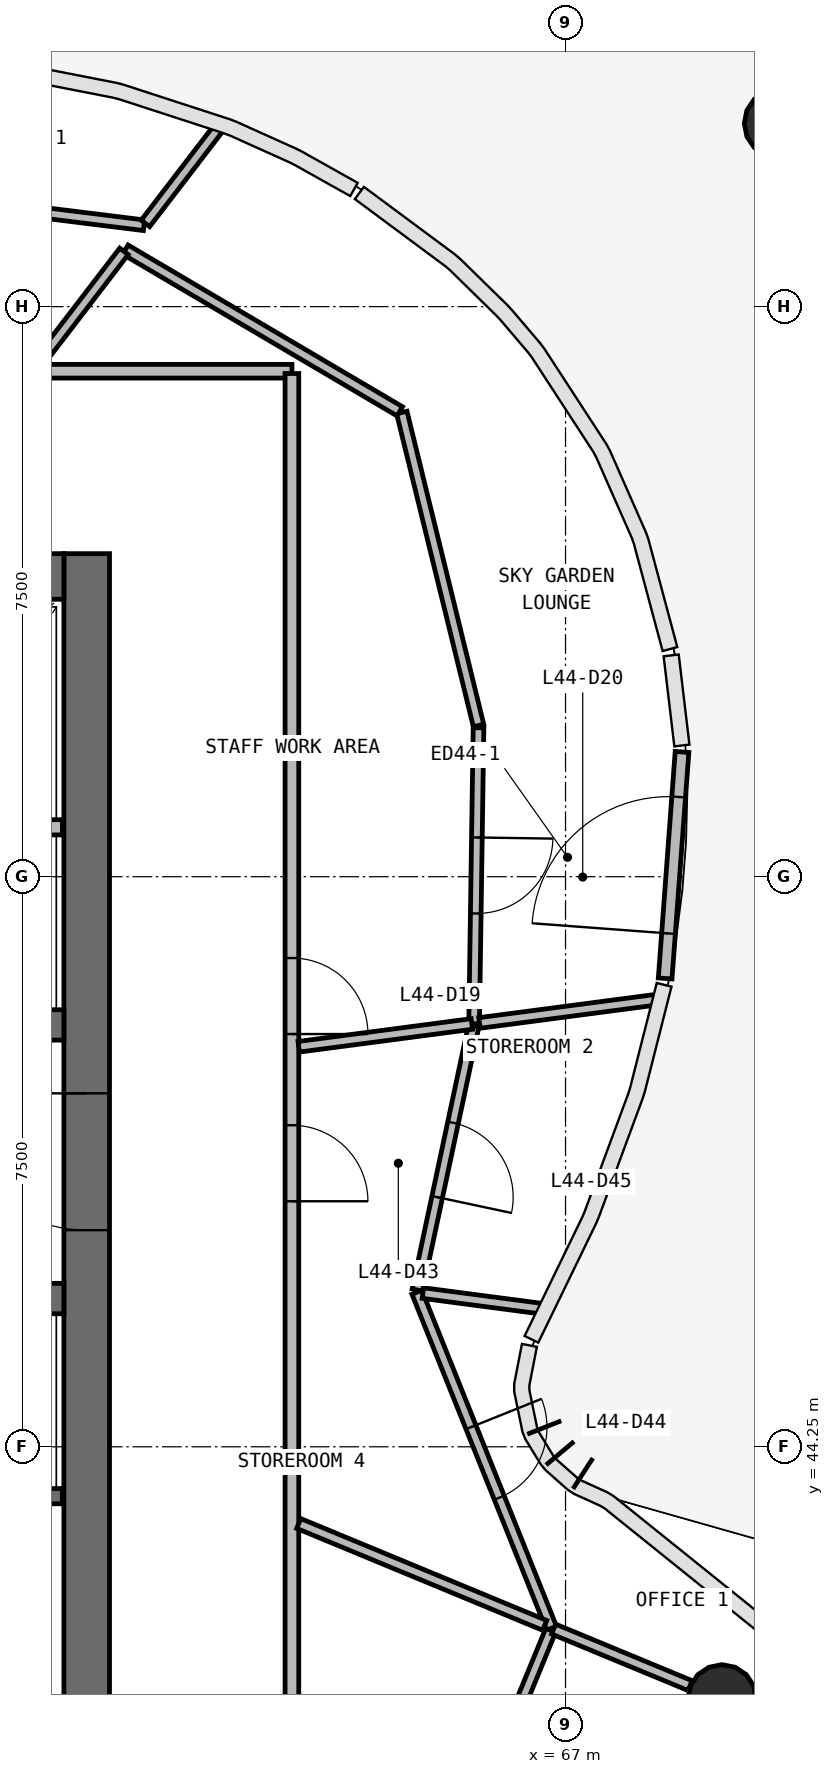
"""IFC4 building model, lengths in metres.
Left out: names, types, materials, properties, quantities, classifications, styles, units other than length and angle.
Written with IfcOpenShell. Run it as: python <this file> out.ifc"""

import sys

from ifc_helpers import new_model, si_unit, direction, frame, frame_2d, origin, origin_2d, place, context, subcontext, project, spatial, rectangle, circle, extrude, source, transform, mapped, element, fill, save


model = new_model("IFC4")
c1 = context("Model", 3, precision=1e-05, world=origin(), true_north=direction((0.0, 1.0)))
c2 = subcontext(c1, "Body", "Model", "MODEL_VIEW")
j1 = project(units=[si_unit("LENGTHUNIT", "METRE"), si_unit("PLANEANGLEUNIT", "RADIAN")], contexts=[c1])
p1 = place(None, origin())
s1 = spatial("IfcSite", under=j1, at=p1, CompositionType="ELEMENT")
p2 = place(p1, origin())
s2 = spatial("IfcBuilding", under=s1, at=p2, CompositionType="ELEMENT")
p3 = place(p2, frame((0.0, 0.0, 183.8)))
s3 = spatial("IfcBuildingStorey", under=s2, at=p3, CompositionType="ELEMENT", Elevation=183.8)
p4 = place(p3, frame((60.7, 40.0, 0.0), z_axis=(0.0, 0.0, 1.0), x_axis=(0.0, 1.0, 0.0)))
e1 = element("IfcWall", 1, at=p4, inside=s3, PredefinedType="SHEAR", context=c2, shape_type="SweptSolid", body=[
    extrude(rectangle(XDim=16.0, YDim=0.6, at=frame_2d((8.0, 0.0))), origin(), (0.0, 0.0, 1.0), 3.9),
])
p5 = place(p4, frame((7.1, 0.0, 0.0)))
e2 = element("IfcOpeningElement", 2, at=p5, cuts=e1, PredefinedType="OPENING", context=c2, shape_type="SweptSolid", body=[
    extrude(rectangle(XDim=1.8, YDim=2.1, at=frame_2d((0.9, 1.05))), frame((0.0, 0.31, 0.0), z_axis=(0.0, -1.0, 0.0), x_axis=(1.0, 0.0, 0.0)), (0.0, 0.0, 1.0), 0.62),
])
p6 = place(p3, frame((60.4, 55.7, 0.0), z_axis=(0.0, 0.0, 1.0), x_axis=(-1.0, 0.0, 0.0)))
e3 = element("IfcWall", 3, at=p6, inside=s3, PredefinedType="SHEAR", context=c2, shape_type="SweptSolid", body=[
    extrude(rectangle(XDim=16.8, YDim=0.6, at=frame_2d((8.4, 0.0))), origin(), (0.0, 0.0, 1.0), 3.9),
])
p7 = place(p6, frame((0.4, 0.0, 0.0)))
e4 = element("IfcOpeningElement", 4, at=p7, cuts=e3, PredefinedType="OPENING", context=c2, shape_type="SweptSolid", body=[
    extrude(rectangle(XDim=1.1, YDim=2.1, at=frame_2d((0.55, 1.05))), frame((0.0, 0.31, 0.0), z_axis=(0.0, -1.0, 0.0), x_axis=(1.0, 0.0, 0.0)), (0.0, 0.0, 1.0), 0.62),
])
p8 = place(p6, frame((10.3, 0.0, 0.0)))
e5 = element("IfcOpeningElement", 5, at=p8, cuts=e3, PredefinedType="OPENING", context=c2, shape_type="SweptSolid", body=[
    extrude(rectangle(XDim=1.2, YDim=2.1, at=frame_2d((0.6, 1.05))), frame((0.0, 0.31, 0.0), z_axis=(0.0, -1.0, 0.0), x_axis=(1.0, 0.0, 0.0)), (0.0, 0.0, 1.0), 0.62),
])
p9 = place(p6, frame((7.25, 0.0, 0.0)))
e6 = element("IfcOpeningElement", 6, at=p9, cuts=e3, PredefinedType="OPENING", context=c2, shape_type="SweptSolid", body=[
    extrude(rectangle(XDim=1.1, YDim=2.1, at=frame_2d((0.55, 1.05))), frame((0.0, 0.31, 0.0), z_axis=(0.0, -1.0, 0.0), x_axis=(1.0, 0.0, 0.0)), (0.0, 0.0, 1.0), 0.62),
])
p10 = place(p3, frame((43.6, 49.8, 0.0), z_axis=(0.0, 0.0, 1.0), x_axis=(1.0, 0.0, 0.0)))
e7 = element("IfcWall", 7, at=p10, inside=s3, PredefinedType="SHEAR", context=c2, shape_type="SweptSolid", body=[
    extrude(rectangle(XDim=16.8, YDim=0.4, at=frame_2d((8.4, 0.0))), origin(), (0.0, 0.0, 1.0), 3.9),
])
p11 = place(p10, frame((9.8, 0.0, 0.0)))
e8 = element("IfcOpeningElement", 8, at=p11, cuts=e7, PredefinedType="OPENING", context=c2, shape_type="SweptSolid", body=[
    extrude(rectangle(XDim=1.1, YDim=2.1, at=frame_2d((0.55, 1.05))), frame((0.0, 0.21, 0.0), z_axis=(0.0, -1.0, 0.0), x_axis=(1.0, 0.0, 0.0)), (0.0, 0.0, 1.0), 0.42),
])
p12 = place(p10, frame((12.3, 0.0, 0.0)))
e9 = element("IfcOpeningElement", 9, at=p12, cuts=e7, PredefinedType="OPENING", context=c2, shape_type="SweptSolid", body=[
    extrude(rectangle(XDim=1.1, YDim=2.1, at=frame_2d((0.55, 1.05))), frame((0.0, 0.21, 0.0), z_axis=(0.0, -1.0, 0.0), x_axis=(1.0, 0.0, 0.0)), (0.0, 0.0, 1.0), 0.42),
])
p13 = place(p10, frame((14.8, 0.0, 0.0)))
e10 = element("IfcOpeningElement", 10, at=p13, cuts=e7, PredefinedType="OPENING", context=c2, shape_type="SweptSolid", body=[
    extrude(rectangle(XDim=1.1, YDim=2.1, at=frame_2d((0.55, 1.05))), frame((0.0, 0.21, 0.0), z_axis=(0.0, -1.0, 0.0), x_axis=(1.0, 0.0, 0.0)), (0.0, 0.0, 1.0), 0.42),
])
p14 = place(p10, frame((4.45, 0.0, 0.0)))
e11 = element("IfcOpeningElement", 11, at=p14, cuts=e7, PredefinedType="OPENING", context=c2, shape_type="SweptSolid", body=[
    extrude(rectangle(XDim=0.9, YDim=2.1, at=frame_2d((0.45, 1.05))), frame((0.0, 0.21, 0.0), z_axis=(0.0, -1.0, 0.0), x_axis=(1.0, 0.0, 0.0)), (0.0, 0.0, 1.0), 0.42),
])
p15 = place(p10, frame((7.85, 0.0, 0.0)))
e12 = element("IfcOpeningElement", 12, at=p15, cuts=e7, PredefinedType="OPENING", context=c2, shape_type="SweptSolid", body=[
    extrude(rectangle(XDim=0.9, YDim=2.1, at=frame_2d((0.45, 1.05))), frame((0.0, 0.21, 0.0), z_axis=(0.0, -1.0, 0.0), x_axis=(1.0, 0.0, 0.0)), (0.0, 0.0, 1.0), 0.42),
])
p16 = place(p3, frame((43.6, 46.2, 0.0), z_axis=(0.0, 0.0, 1.0), x_axis=(1.0, 0.0, 0.0)))
e13 = element("IfcWall", 13, at=p16, inside=s3, PredefinedType="SHEAR", context=c2, shape_type="SweptSolid", body=[
    extrude(rectangle(XDim=16.8, YDim=0.4, at=frame_2d((8.4, 0.0))), origin(), (0.0, 0.0, 1.0), 3.9),
])
p17 = place(p16, frame((9.8, 0.0, 0.0)))
e14 = element("IfcOpeningElement", 14, at=p17, cuts=e13, PredefinedType="OPENING", context=c2, shape_type="SweptSolid", body=[
    extrude(rectangle(XDim=1.1, YDim=2.1, at=frame_2d((0.55, 1.05))), frame((0.0, 0.21, 0.0), z_axis=(0.0, -1.0, 0.0), x_axis=(1.0, 0.0, 0.0)), (0.0, 0.0, 1.0), 0.42),
])
p18 = place(p16, frame((12.3, 0.0, 0.0)))
e15 = element("IfcOpeningElement", 15, at=p18, cuts=e13, PredefinedType="OPENING", context=c2, shape_type="SweptSolid", body=[
    extrude(rectangle(XDim=1.1, YDim=2.1, at=frame_2d((0.55, 1.05))), frame((0.0, 0.21, 0.0), z_axis=(0.0, -1.0, 0.0), x_axis=(1.0, 0.0, 0.0)), (0.0, 0.0, 1.0), 0.42),
])
p19 = place(p16, frame((14.8, 0.0, 0.0)))
e16 = element("IfcOpeningElement", 16, at=p19, cuts=e13, PredefinedType="OPENING", context=c2, shape_type="SweptSolid", body=[
    extrude(rectangle(XDim=1.1, YDim=2.1, at=frame_2d((0.55, 1.05))), frame((0.0, 0.21, 0.0), z_axis=(0.0, -1.0, 0.0), x_axis=(1.0, 0.0, 0.0)), (0.0, 0.0, 1.0), 0.42),
])
p20 = place(p16, frame((7.85, 0.0, 0.0)))
e17 = element("IfcOpeningElement", 17, at=p20, cuts=e13, PredefinedType="OPENING", context=c2, shape_type="SweptSolid", body=[
    extrude(rectangle(XDim=0.9, YDim=2.1, at=frame_2d((0.45, 1.05))), frame((0.0, 0.21, 0.0), z_axis=(0.0, -1.0, 0.0), x_axis=(1.0, 0.0, 0.0)), (0.0, 0.0, 1.0), 0.42),
])
m1 = source(origin(), c2, "Body", "SweptSolid", [
    extrude(circle(Radius=0.45, at=origin_2d()), origin(), (0.0, 0.0, 1.0), 4.22),
])
for number, where, z_axis, x_axis in (
    (18, (69.802, 61.66, -0.32), (0.0, 0.0, 1.0), (1.0, 0.0, 0.0)),
    (19, (69.059, 40.934, -0.32), (0.0, 0.0, 1.0), (1.0, 0.0, 0.0)),
):
    element("IfcColumn", number, at=place(p3, frame(where, z_axis=z_axis, x_axis=x_axis)), inside=s3, PredefinedType="COLUMN", context=c2, shape_type="MappedRepresentation", body=[
        mapped(m1, transform((0.0, 0.0, 0.0), scale=1.0)),
    ])
p21 = place(p3, frame((68.311, 50.412, 0.0), z_axis=(0.0, 0.0, 1.0), x_axis=(0.074271967477, 0.997238023166, 0.0)))
e20 = element("IfcWall", 20, at=p21, inside=s3, PredefinedType="STANDARD", context=c2, shape_type="SweptSolid", body=[
    extrude(rectangle(XDim=2.988, YDim=0.18, at=frame_2d((1.494, 0.0))), origin(), (0.0, 0.0, 1.0), 3.58),
])
p22 = place(p21, frame((0.594, 0.0, 0.0)))
e21 = element("IfcOpeningElement", 21, at=p22, cuts=e20, PredefinedType="OPENING", context=c2, shape_type="SweptSolid", body=[
    extrude(rectangle(XDim=1.8, YDim=2.4, at=frame_2d((0.9, 1.2))), frame((0.0, 0.1, 0.0), z_axis=(0.0, -1.0, 0.0), x_axis=(1.0, 0.0, 0.0)), (0.0, 0.0, 1.0), 0.2),
])
p23 = place(p3, frame((57.7, 43.6, 0.0), z_axis=(0.0, 0.0, 1.0), x_axis=(1.0, 0.0, 0.0)))
e22 = element("IfcWall", 22, at=p23, inside=s3, PredefinedType="SOLIDWALL", context=c2, shape_type="SweptSolid", body=[
    extrude(rectangle(XDim=2.68, YDim=0.2, at=frame_2d((1.34, 0.0))), origin(), (0.0, 0.0, 1.0), 3.58),
])
p24 = place(p3, frame((60.38, 52.4, 0.0), z_axis=(0.0, 0.0, 1.0), x_axis=(-1.0, 0.0, 0.0)))
e23 = element("IfcWall", 23, at=p24, inside=s3, PredefinedType="SOLIDWALL", context=c2, shape_type="SweptSolid", body=[
    extrude(rectangle(XDim=1.85, YDim=0.2, at=frame_2d((0.925, 0.0))), origin(), (0.0, 0.0, 1.0), 3.58),
])
p25 = place(p3, frame((40.6, 58.4, 0.0), z_axis=(0.0, 0.0, 1.0), x_axis=(1.0, 0.0, 0.0)))
e24 = element("IfcWall", 24, at=p25, inside=s3, PredefinedType="PARTITIONING", context=c2, shape_type="SweptSolid", body=[
    extrude(rectangle(XDim=22.8, YDim=0.18, at=frame_2d((11.4, 0.0))), origin(), (0.0, 0.0, 1.0), 2.88),
])
p26 = place(p25, frame((16.05, 0.0, 0.0)))
e25 = element("IfcOpeningElement", 25, at=p26, cuts=e24, PredefinedType="OPENING", context=c2, shape_type="SweptSolid", body=[
    extrude(rectangle(XDim=0.9, YDim=2.1, at=frame_2d((0.45, 1.05))), frame((0.0, 0.1, 0.0), z_axis=(0.0, -1.0, 0.0), x_axis=(1.0, 0.0, 0.0)), (0.0, 0.0, 1.0), 0.2),
])
p27 = place(p25, frame((13.05, 0.0, 0.0)))
e26 = element("IfcOpeningElement", 26, at=p27, cuts=e24, PredefinedType="OPENING", context=c2, shape_type="SweptSolid", body=[
    extrude(rectangle(XDim=0.9, YDim=2.1, at=frame_2d((0.45, 1.05))), frame((0.0, 0.1, 0.0), z_axis=(0.0, -1.0, 0.0), x_axis=(1.0, 0.0, 0.0)), (0.0, 0.0, 1.0), 0.2),
])
p28 = place(p25, frame((10.95, 0.0, 0.0)))
e27 = element("IfcOpeningElement", 27, at=p28, cuts=e24, PredefinedType="OPENING", context=c2, shape_type="SweptSolid", body=[
    extrude(rectangle(XDim=1.0, YDim=2.1, at=frame_2d((0.5, 1.05))), frame((0.0, 0.1, 0.0), z_axis=(0.0, -1.0, 0.0), x_axis=(1.0, 0.0, 0.0)), (0.0, 0.0, 1.0), 0.2),
])
p29 = place(p3, frame((63.4, 58.37, 0.0), z_axis=(0.0, 0.0, 1.0), x_axis=(0.0, -1.0, 0.0)))
e28 = element("IfcWall", 28, at=p29, inside=s3, PredefinedType="PARTITIONING", context=c2, shape_type="SweptSolid", body=[
    extrude(rectangle(XDim=20.74, YDim=0.18, at=frame_2d((10.37, 0.0))), origin(), (0.0, 0.0, 1.0), 2.88),
])
p30 = place(p29, frame((7.69, 0.0, 0.0)))
e29 = element("IfcOpeningElement", 29, at=p30, cuts=e28, PredefinedType="OPENING", context=c2, shape_type="SweptSolid", body=[
    extrude(rectangle(XDim=1.0, YDim=2.1, at=frame_2d((0.5, 1.05))), frame((0.0, 0.1, 0.0), z_axis=(0.0, -1.0, 0.0), x_axis=(1.0, 0.0, 0.0)), (0.0, 0.0, 1.0), 0.2),
])
p31 = place(p29, frame((9.89, 0.0, 0.0)))
e30 = element("IfcOpeningElement", 30, at=p31, cuts=e28, PredefinedType="OPENING", context=c2, shape_type="SweptSolid", body=[
    extrude(rectangle(XDim=1.0, YDim=2.1, at=frame_2d((0.5, 1.05))), frame((0.0, 0.1, 0.0), z_axis=(0.0, -1.0, 0.0), x_axis=(1.0, 0.0, 0.0)), (0.0, 0.0, 1.0), 0.2),
])
p32 = place(p3, frame((65.044, 46.283, 0.0), z_axis=(0.0, 0.0, 1.0), x_axis=(0.372115410521, -0.92818646901, 0.0)))
e31 = element("IfcWall", 31, at=p32, inside=s3, PredefinedType="PARTITIONING", context=c2, shape_type="SweptSolid", body=[
    extrude(rectangle(XDim=4.762, YDim=0.14, at=frame_2d((2.381, 0.0))), origin(), (0.0, 0.0, 1.0), 2.88),
])
p33 = place(p32, frame((1.912, 0.0, 0.0)))
e32 = element("IfcOpeningElement", 32, at=p33, cuts=e31, PredefinedType="OPENING", context=c2, shape_type="SweptSolid", body=[
    extrude(rectangle(XDim=1.0, YDim=2.1, at=frame_2d((0.5, 1.05))), frame((0.0, 0.08, 0.0), z_axis=(0.0, -1.0, 0.0), x_axis=(1.0, 0.0, 0.0)), (0.0, 0.0, 1.0), 0.16),
])
p34 = place(p3, frame((66.805, 41.835, 0.0), z_axis=(0.0, 0.0, 1.0), x_axis=(-0.380060488543, -0.924961634366, 0.0)))
e33 = element("IfcWall", 33, at=p34, inside=s3, PredefinedType="PARTITIONING", context=c2, shape_type="SweptSolid", body=[
    extrude(rectangle(XDim=4.24, YDim=0.14, at=frame_2d((2.12, 0.0))), origin(), (0.0, 0.0, 1.0), 2.88),
])
p35 = place(p34, frame((1.59, 0.0, 0.0)))
e34 = element("IfcOpeningElement", 34, at=p35, cuts=e33, PredefinedType="OPENING", context=c2, shape_type="SweptSolid", body=[
    extrude(rectangle(XDim=1.0, YDim=2.1, at=frame_2d((0.5, 1.05))), frame((0.0, 0.08, 0.0), z_axis=(0.0, -1.0, 0.0), x_axis=(1.0, 0.0, 0.0)), (0.0, 0.0, 1.0), 0.16),
])
p36 = place(p3, frame((65.856, 53.739, 0.0), z_axis=(0.0, 0.0, 1.0), x_axis=(-0.23822460229, 0.971210089972, 0.0)))
e35 = element("IfcWall", 35, at=p36, inside=s3, PredefinedType="PARTITIONING", context=c2, shape_type="SweptSolid", body=[
    extrude(rectangle(XDim=4.24, YDim=0.14, at=frame_2d((2.12, 0.0))), origin(), (0.0, 0.0, 1.0), 2.88),
])
p37 = place(p3, frame((64.82, 57.872, 0.0), z_axis=(0.0, 0.0, 1.0), x_axis=(-0.861535732384, 0.507696938957, 0.0)))
e36 = element("IfcWall", 36, at=p37, inside=s3, PredefinedType="PARTITIONING", context=c2, shape_type="SweptSolid", body=[
    extrude(rectangle(XDim=4.192, YDim=0.14, at=frame_2d((2.096, 0.0))), origin(), (0.0, 0.0, 1.0), 2.88),
])
p38 = place(p3, frame((61.454, 60.321, 0.0), z_axis=(0.0, 0.0, 1.0), x_axis=(-0.99239722015, 0.123076226135, 0.0)))
e37 = element("IfcWall", 37, at=p38, inside=s3, PredefinedType="PARTITIONING", context=c2, shape_type="SweptSolid", body=[
    extrude(rectangle(XDim=4.17, YDim=0.14, at=frame_2d((2.085, 0.0))), origin(), (0.0, 0.0, 1.0), 2.88),
])
p39 = place(p3, frame((65.855, 53.709, 0.0), z_axis=(0.0, 0.0, 1.0), x_axis=(-0.014924646714, -0.999888621258, 0.0)))
e38 = element("IfcWall", 38, at=p39, inside=s3, PredefinedType="PARTITIONING", context=c2, shape_type="SweptSolid", body=[
    extrude(rectangle(XDim=3.893, YDim=0.14, at=frame_2d((1.947, 0.0))), origin(), (0.0, 0.0, 1.0), 2.88),
])
p40 = place(p39, frame((1.443, 0.0, 0.0)))
e39 = element("IfcOpeningElement", 39, at=p40, cuts=e38, PredefinedType="OPENING", context=c2, shape_type="SweptSolid", body=[
    extrude(rectangle(XDim=1.0, YDim=2.1, at=frame_2d((0.5, 1.05))), frame((0.0, 0.08, 0.0), z_axis=(0.0, -1.0, 0.0), x_axis=(1.0, 0.0, 0.0)), (0.0, 0.0, 1.0), 0.16),
])
p41 = place(p3, frame((63.49, 43.241, 0.0), z_axis=(0.0, 0.0, 1.0), x_axis=(0.92386899199, -0.382708878444, 0.0)))
e40 = element("IfcWall", 40, at=p41, inside=s3, PredefinedType="PARTITIONING", context=c2, shape_type="SweptSolid", body=[
    extrude(rectangle(XDim=3.502, YDim=0.14, at=frame_2d((1.751, 0.0))), origin(), (0.0, 0.0, 1.0), 2.88),
])
p42 = place(p3, frame((65.791, 49.787, 0.0), z_axis=(0.0, 0.0, 1.0), x_axis=(-0.20840274736, -0.978043094599, 0.0)))
e41 = element("IfcWall", 41, at=p42, inside=s3, PredefinedType="PARTITIONING", context=c2, shape_type="SweptSolid", body=[
    extrude(rectangle(XDim=3.553, YDim=0.14, at=frame_2d((1.777, 0.0))), origin(), (0.0, 0.0, 1.0), 2.88),
])
p43 = place(p42, frame((1.303, 0.0, 0.0)))
e42 = element("IfcOpeningElement", 42, at=p43, cuts=e41, PredefinedType="OPENING", context=c2, shape_type="SweptSolid", body=[
    extrude(rectangle(XDim=1.0, YDim=2.1, at=frame_2d((0.5, 1.05))), frame((0.0, 0.08, 0.0), z_axis=(0.0, -1.0, 0.0), x_axis=(1.0, 0.0, 0.0)), (0.0, 0.0, 1.0), 0.16),
])
p44 = place(p3, frame((65.867, 49.826, 0.0), z_axis=(0.0, 0.0, 1.0), x_axis=(0.991441898965, 0.130548691974, 0.0)))
e43 = element("IfcWall", 43, at=p44, inside=s3, PredefinedType="PARTITIONING", context=c2, shape_type="SweptSolid", body=[
    extrude(rectangle(XDim=2.347, YDim=0.14, at=frame_2d((1.173, 0.0))), origin(), (0.0, 0.0, 1.0), 2.88),
])
p45 = place(p3, frame((63.49, 49.513, 0.0), z_axis=(0.0, 0.0, 1.0), x_axis=(0.991447421324, 0.130506745995, 0.0)))
e44 = element("IfcWall", 44, at=p45, inside=s3, PredefinedType="PARTITIONING", context=c2, shape_type="SweptSolid", body=[
    extrude(rectangle(XDim=2.297, YDim=0.14, at=frame_2d((1.148, 0.0))), origin(), (0.0, 0.0, 1.0), 2.88),
])
p46 = place(p3, frame((60.049, 58.49, 0.0), z_axis=(0.0, 0.0, 1.0), x_axis=(0.60874059601, 0.793369325579, 0.0)))
e45 = element("IfcWall", 45, at=p46, inside=s3, PredefinedType="PARTITIONING", context=c2, shape_type="SweptSolid", body=[
    extrude(rectangle(XDim=1.874, YDim=0.14, at=frame_2d((0.937, 0.0))), origin(), (0.0, 0.0, 1.0), 2.88),
])
p47 = place(p3, frame((66.844, 41.852, 0.0), z_axis=(0.0, 0.0, 1.0), x_axis=(0.923848346372, -0.38275871369, 0.0)))
e46 = element("IfcWall", 46, at=p47, inside=s3, PredefinedType="PARTITIONING", context=c2, shape_type="SweptSolid", body=[
    extrude(rectangle(XDim=1.943, YDim=0.14, at=frame_2d((0.971, 0.0))), origin(), (0.0, 0.0, 1.0), 2.88),
])
p48 = place(p3, frame((65.124, 46.272, 0.0), z_axis=(0.0, 0.0, 1.0), x_axis=(0.991440073303, -0.130562556072, 0.0)))
e47 = element("IfcWall", 47, at=p48, inside=s3, PredefinedType="PARTITIONING", context=c2, shape_type="SweptSolid", body=[
    extrude(rectangle(XDim=1.578, YDim=0.14, at=frame_2d((0.789, 0.0))), origin(), (0.0, 0.0, 1.0), 2.88),
])
p49 = place(p3, frame((61.472, 60.344, 0.0), z_axis=(0.0, 0.0, 1.0), x_axis=(0.608719514622, 0.793385500572, 0.0)))
e48 = element("IfcWall", 48, at=p49, inside=s3, PredefinedType="PARTITIONING", context=c2, shape_type="SweptSolid", body=[
    extrude(rectangle(XDim=1.584, YDim=0.14, at=frame_2d((0.792, 0.0))), origin(), (0.0, 0.0, 1.0), 2.88),
])
m2 = source(origin(), c2, "Body", "SweptSolid", [
    extrude(rectangle(XDim=1.8, YDim=2.4, at=frame_2d((0.9, 1.2))), frame((0.0, 0.025, 0.0), z_axis=(0.0, -1.0, 0.0), x_axis=(1.0, 0.0, 0.0)), (0.0, 0.0, 1.0), 0.05),
])
p50 = place(p22, origin())
e49 = element("IfcDoor", 49, at=p50, inside=s3, OperationType="DOUBLE_DOOR_SINGLE_SWING", PredefinedType="DOOR", context=c2, shape_type="MappedRepresentation", body=[
    mapped(m2, transform((0.0, 0.0, 0.0), scale=1.0)),
])
fill(e21, e49)
m3 = source(origin(), c2, "Body", "SweptSolid", [
    extrude(rectangle(XDim=1.8, YDim=2.1, at=frame_2d((0.9, 1.05))), frame((0.0, 0.025, 0.0), z_axis=(0.0, -1.0, 0.0), x_axis=(1.0, 0.0, 0.0)), (0.0, 0.0, 1.0), 0.05),
])
p51 = place(p5, origin())
e50 = element("IfcDoor", 50, at=p51, inside=s3, OperationType="SINGLE_SWING_RIGHT", PredefinedType="DOOR", context=c2, shape_type="MappedRepresentation", body=[
    mapped(m3, transform((0.0, 0.0, 0.0), scale=1.0)),
])
fill(e2, e50)
m4 = source(origin(), c2, "Body", "SweptSolid", [
    extrude(rectangle(XDim=1.0, YDim=2.1, at=frame_2d((0.5, 1.05))), frame((0.0, 0.025, 0.0), z_axis=(0.0, -1.0, 0.0), x_axis=(1.0, 0.0, 0.0)), (0.0, 0.0, 1.0), 0.05),
])
p52 = place(p30, origin())
e51 = element("IfcDoor", 51, at=p52, inside=s3, OperationType="SINGLE_SWING_RIGHT", PredefinedType="DOOR", context=c2, shape_type="MappedRepresentation", body=[
    mapped(m4, transform((0.0, 0.0, 0.0), scale=1.0)),
])
fill(e29, e51)
p53 = place(p40, origin())
e52 = element("IfcDoor", 52, at=p53, inside=s3, OperationType="SINGLE_SWING_LEFT", PredefinedType="DOOR", context=c2, shape_type="MappedRepresentation", body=[
    mapped(m4, transform((0.0, 0.0, 0.0), scale=1.0)),
])
fill(e39, e52)
p54 = place(p31, origin())
e53 = element("IfcDoor", 53, at=p54, inside=s3, OperationType="SINGLE_SWING_RIGHT", PredefinedType="DOOR", context=c2, shape_type="MappedRepresentation", body=[
    mapped(m4, transform((0.0, 0.0, 0.0), scale=1.0)),
])
fill(e30, e53)
p55 = place(p33, origin())
e54 = element("IfcDoor", 54, at=p55, inside=s3, OperationType="SINGLE_SWING_LEFT", PredefinedType="DOOR", context=c2, shape_type="MappedRepresentation", body=[
    mapped(m4, transform((0.0, 0.0, 0.0), scale=1.0)),
])
fill(e32, e54)
p56 = place(p43, origin())
e55 = element("IfcDoor", 55, at=p56, inside=s3, OperationType="SINGLE_SWING_RIGHT", PredefinedType="DOOR", context=c2, shape_type="MappedRepresentation", body=[
    mapped(m4, transform((0.0, 0.0, 0.0), scale=1.0)),
])
fill(e42, e55)
save(model, sys.argv[1])
